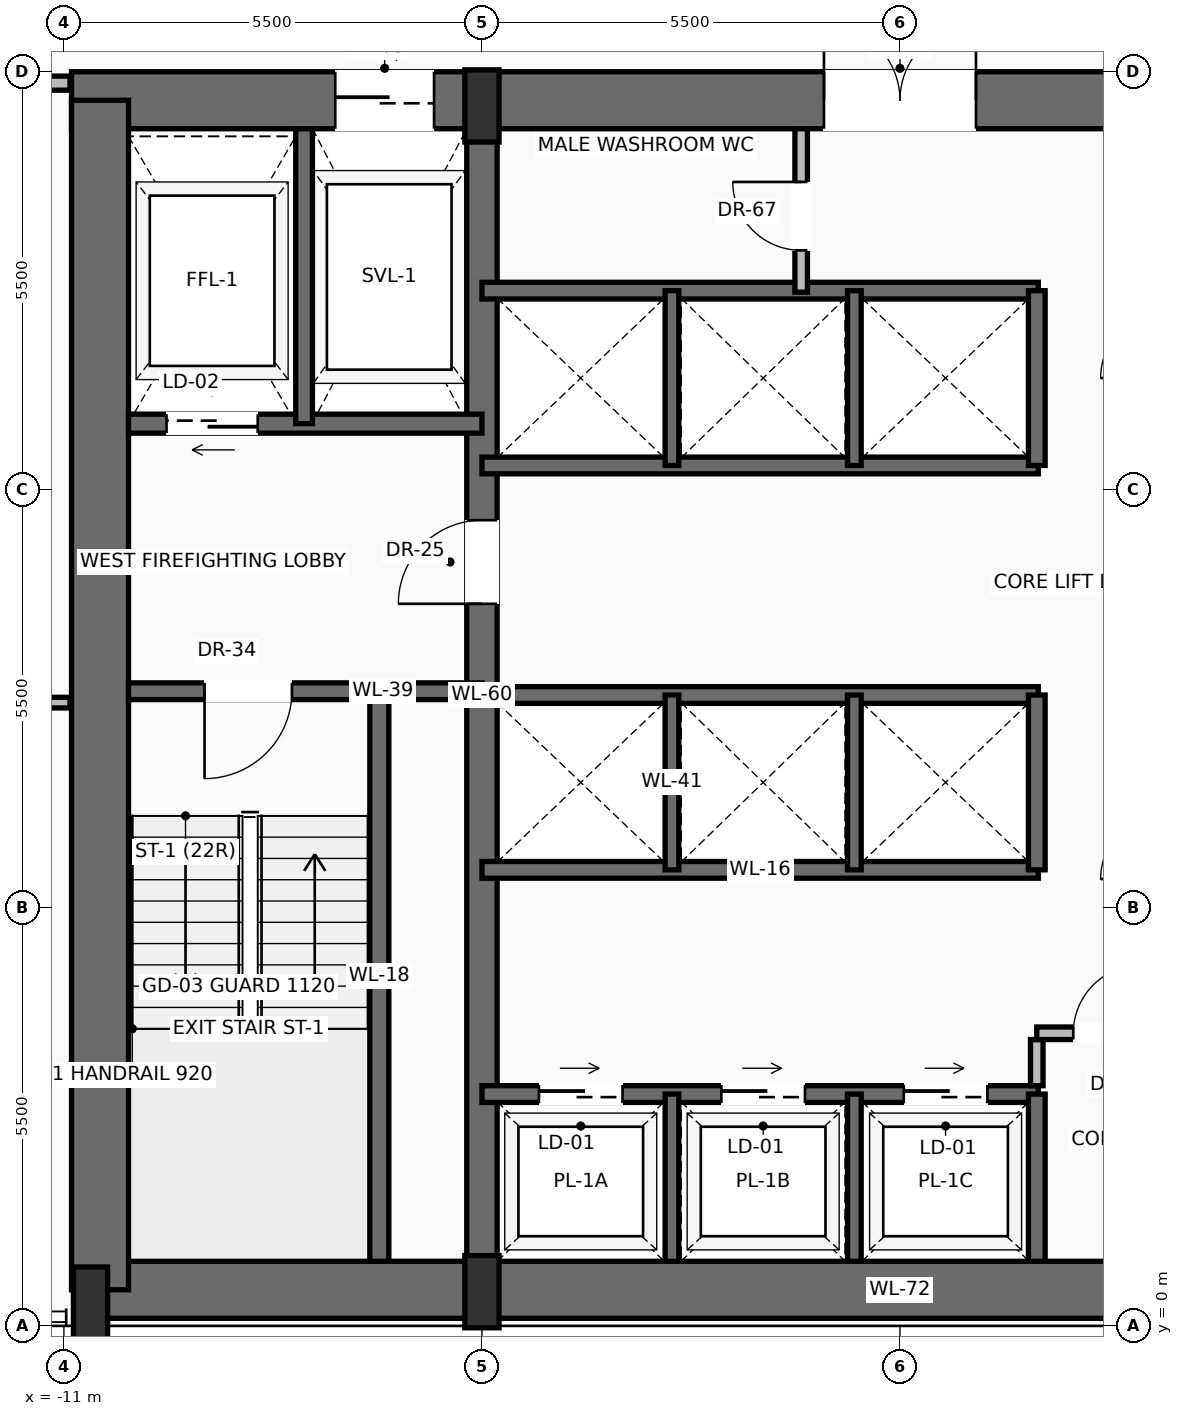
"""IFC4 building model, lengths in metres.
Left out: names, types, materials, properties, quantities, classifications, styles, units other than length and angle.
Written with IfcOpenShell. Run it as: python <this file> out.ifc"""

import sys

from ifc_helpers import new_model, si_unit, direction, frame, frame_2d, origin, origin_2d, place, context, subcontext, project, spatial, rectangle, extrude, source, transform, mapped, element, fill, save


model = new_model("IFC4")
c1 = context("Model", 3, precision=1e-05, world=origin(), true_north=direction((0.0, 1.0)))
c2 = subcontext(c1, "Body", "Model", "MODEL_VIEW")
j1 = project(units=[si_unit("LENGTHUNIT", "METRE"), si_unit("PLANEANGLEUNIT", "RADIAN")], contexts=[c1])
p1 = place(None, origin())
s1 = spatial("IfcSite", under=j1, at=p1, CompositionType="ELEMENT")
p2 = place(p1, origin())
s2 = spatial("IfcBuilding", under=s1, at=p2, CompositionType="ELEMENT")
p3 = place(p2, frame((0.0, 0.0, 102.5)))
s3 = spatial("IfcBuildingStorey", under=s2, at=p3, CompositionType="ELEMENT", Elevation=102.5)
p4 = place(p3, frame((-10.65, 0.475, 0.0), z_axis=(0.0, 0.0, 1.0), x_axis=(1.0, 0.0, 0.0)))
e1 = element("IfcWall", 1, at=p4, inside=s3, PredefinedType="SHEAR", context=c2, shape_type="SweptSolid", body=[
    extrude(rectangle(XDim=21.3, YDim=0.75, at=frame_2d((10.65, 0.0))), origin(), (0.0, 0.0, 1.0), 3.45),
])
p5 = place(p3, frame((-10.9, 16.125, 0.0), z_axis=(0.0, 0.0, 1.0), x_axis=(1.0, 0.0, 0.0)))
e2 = element("IfcWall", 2, at=p5, inside=s3, PredefinedType="SHEAR", context=c2, shape_type="SweptSolid", body=[
    extrude(rectangle(XDim=21.8, YDim=0.75, at=frame_2d((10.9, 0.0))), origin(), (0.0, 0.0, 1.0), 3.45),
])
p6 = place(p5, frame((3.47, 0.0, 0.0)))
e3 = element("IfcOpeningElement", 3, at=p6, cuts=e2, PredefinedType="OPENING", context=c2, shape_type="SweptSolid", body=[
    extrude(rectangle(XDim=1.3, YDim=2.3, at=frame_2d((0.65, 1.15))), frame((0.0, 0.385, 0.0), z_axis=(0.0, -1.0, 0.0), x_axis=(1.0, 0.0, 0.0)), (0.0, 0.0, 1.0), 0.77),
])
p7 = place(p5, frame((9.9, 0.0, 0.0)))
e4 = element("IfcOpeningElement", 4, at=p7, cuts=e2, PredefinedType="OPENING", context=c2, shape_type="SweptSolid", body=[
    extrude(rectangle(XDim=2.0, YDim=2.4, at=frame_2d((1.0, 1.2))), frame((0.0, 0.385, 0.0), z_axis=(0.0, -1.0, 0.0), x_axis=(1.0, 0.0, 0.0)), (0.0, 0.0, 1.0), 0.77),
])
p8 = place(p3, frame((-10.525, 0.475, 0.0), z_axis=(0.0, 0.0, 1.0), x_axis=(0.0, 1.0, 0.0)))
e5 = element("IfcWall", 5, at=p8, inside=s3, PredefinedType="SHEAR", context=c2, shape_type="SweptSolid", body=[
    extrude(rectangle(XDim=15.65, YDim=0.75, at=frame_2d((7.825, 0.0))), origin(), (0.0, 0.0, 1.0), 3.45),
])
p9 = place(p3, frame((-5.5, 0.475, 0.0), z_axis=(0.0, 0.0, 1.0), x_axis=(0.0, 1.0, 0.0)))
e6 = element("IfcWall", 6, at=p9, inside=s3, PredefinedType="SHEAR", context=c2, shape_type="SweptSolid", body=[
    extrude(rectangle(XDim=15.65, YDim=0.4, at=frame_2d((7.825, 0.0))), origin(), (0.0, 0.0, 1.0), 3.45),
])
p10 = place(p9, frame((9.025, 0.0, 0.0)))
e7 = element("IfcOpeningElement", 7, at=p10, cuts=e6, PredefinedType="OPENING", context=c2, shape_type="SweptSolid", body=[
    extrude(rectangle(XDim=1.1, YDim=2.2, at=frame_2d((0.55, 1.1))), frame((0.0, 0.21, 0.0), z_axis=(0.0, -1.0, 0.0), x_axis=(1.0, 0.0, 0.0)), (0.0, 0.0, 1.0), 0.42),
])
m1 = source(origin(), c2, "Body", "SweptSolid", [
    extrude(rectangle(XDim=0.45, YDim=0.95, at=origin_2d()), origin(), (0.0, 0.0, 1.0), 3.7),
])
for number, where, z_axis, x_axis in (
    (8, (-10.65, 0.3, 0.0), (0.0, 0.0, 1.0), (1.0, 0.0, 0.0)),
    (9, (-5.5, 0.45, 0.0), (0.0, 0.0, 1.0), (1.0, 0.0, 0.0)),
    (10, (-5.5, 16.05, 0.0), (0.0, 0.0, 1.0), (1.0, 0.0, 0.0)),
):
    element("IfcColumn", number, at=place(p3, frame(where, z_axis=z_axis, x_axis=x_axis)), inside=s3, PredefinedType="PILASTER", context=c2, shape_type="MappedRepresentation", body=[
        mapped(m1, transform((0.0, 0.0, 0.0), scale=1.0)),
    ])
p11 = place(p3, frame((-6.85, 0.85, 0.0), z_axis=(0.0, 0.0, 1.0), x_axis=(0.0, 1.0, 0.0)))
e11 = element("IfcWall", 11, at=p11, inside=s3, PredefinedType="SOLIDWALL", context=c2, shape_type="SweptSolid", body=[
    extrude(rectangle(XDim=7.5, YDim=0.25, at=frame_2d((3.75, 0.0))), origin(), (0.0, 0.0, 1.0), 3.45),
])
p12 = place(p3, frame((-5.5, 8.35, 0.0), z_axis=(0.0, 0.0, 1.0), x_axis=(-1.0, 0.0, 0.0)))
e12 = element("IfcWall", 12, at=p12, inside=s3, PredefinedType="SOLIDWALL", context=c2, shape_type="SweptSolid", body=[
    extrude(rectangle(XDim=4.65, YDim=0.22, at=frame_2d((2.325, 0.0))), origin(), (0.0, 0.0, 1.0), 3.45),
])
p13 = place(p12, frame((2.5, 0.0, 0.0)))
e13 = element("IfcOpeningElement", 13, at=p13, cuts=e12, PredefinedType="OPENING", context=c2, shape_type="SweptSolid", body=[
    extrude(rectangle(XDim=1.15, YDim=2.2, at=frame_2d((0.575, 1.1))), frame((0.0, 0.12, 0.0), z_axis=(0.0, -1.0, 0.0), x_axis=(1.0, 0.0, 0.0)), (0.0, 0.0, 1.0), 0.24),
])
p14 = place(p3, frame((-5.5, 11.87, 0.0), z_axis=(0.0, 0.0, 1.0), x_axis=(-1.0, 0.0, 0.0)))
e14 = element("IfcWall", 14, at=p14, inside=s3, PredefinedType="SOLIDWALL", context=c2, shape_type="SweptSolid", body=[
    extrude(rectangle(XDim=4.65, YDim=0.25, at=frame_2d((2.325, 0.0))), origin(), (0.0, 0.0, 1.0), 3.45),
])
p15 = place(p14, frame((2.95, 0.0, 0.0)))
e15 = element("IfcOpeningElement", 15, at=p15, cuts=e14, PredefinedType="OPENING", context=c2, shape_type="SweptSolid", body=[
    extrude(rectangle(XDim=1.2, YDim=2.25, at=frame_2d((0.6, 1.125))), frame((0.0, 0.135, 0.0), z_axis=(0.0, -1.0, 0.0), x_axis=(1.0, 0.0, 0.0)), (0.0, 0.0, 1.0), 0.27),
])
p16 = place(p3, frame((-7.84, 11.87, 0.0), z_axis=(0.0, 0.0, 1.0), x_axis=(0.0, 1.0, 0.0)))
e16 = element("IfcWall", 16, at=p16, inside=s3, PredefinedType="SOLIDWALL", context=c2, shape_type="SweptSolid", body=[
    extrude(rectangle(XDim=3.88, YDim=0.22, at=frame_2d((1.94, 0.0))), origin(), (0.0, 0.0, 1.0), 3.45),
])
p17 = place(p3, frame((-5.5, 3.05, 0.0), z_axis=(0.0, 0.0, 1.0), x_axis=(1.0, 0.0, 0.0)))
e17 = element("IfcWall", 17, at=p17, inside=s3, PredefinedType="SOLIDWALL", context=c2, shape_type="SweptSolid", body=[
    extrude(rectangle(XDim=7.32, YDim=0.22, at=frame_2d((3.66, 0.0))), origin(), (0.0, 0.0, 1.0), 3.45),
])
p18 = place(p17, frame((0.75, 0.0, 0.0)))
e18 = element("IfcOpeningElement", 18, at=p18, cuts=e17, PredefinedType="OPENING", context=c2, shape_type="SweptSolid", body=[
    extrude(rectangle(XDim=1.1, YDim=2.2, at=frame_2d((0.55, 1.1))), frame((0.0, 0.12, 0.0), z_axis=(0.0, -1.0, 0.0), x_axis=(1.0, 0.0, 0.0)), (0.0, 0.0, 1.0), 0.24),
])
p19 = place(p17, frame((3.15, 0.0, 0.0)))
e19 = element("IfcOpeningElement", 19, at=p19, cuts=e17, PredefinedType="OPENING", context=c2, shape_type="SweptSolid", body=[
    extrude(rectangle(XDim=1.1, YDim=2.2, at=frame_2d((0.55, 1.1))), frame((0.0, 0.12, 0.0), z_axis=(0.0, -1.0, 0.0), x_axis=(1.0, 0.0, 0.0)), (0.0, 0.0, 1.0), 0.24),
])
p20 = place(p17, frame((5.55, 0.0, 0.0)))
e20 = element("IfcOpeningElement", 20, at=p20, cuts=e17, PredefinedType="OPENING", context=c2, shape_type="SweptSolid", body=[
    extrude(rectangle(XDim=1.1, YDim=2.2, at=frame_2d((0.55, 1.1))), frame((0.0, 0.12, 0.0), z_axis=(0.0, -1.0, 0.0), x_axis=(1.0, 0.0, 0.0)), (0.0, 0.0, 1.0), 0.24),
])
p21 = place(p3, frame((1.8, 0.85, 0.0), z_axis=(0.0, 0.0, 1.0), x_axis=(0.0, 1.0, 0.0)))
e21 = element("IfcWall", 21, at=p21, inside=s3, PredefinedType="SOLIDWALL", context=c2, shape_type="SweptSolid", body=[
    extrude(rectangle(XDim=2.2, YDim=0.22, at=frame_2d((1.1, 0.0))), origin(), (0.0, 0.0, 1.0), 3.45),
])
for number, where, z_axis, x_axis in (
    (22, (-3.0, 0.85, 0.0), (0.0, 0.0, 1.0), (0.0, 1.0, 0.0)),
    (23, (-0.6, 0.85, 0.0), (0.0, 0.0, 1.0), (0.0, 1.0, 0.0)),
):
    element("IfcWall", number, at=place(p3, frame(where, z_axis=z_axis, x_axis=x_axis)), inside=s3, PredefinedType="SOLIDWALL", context=c2, shape_type="SweptSolid", body=[
        extrude(rectangle(XDim=2.2, YDim=0.18, at=frame_2d((1.1, 0.0))), origin(), (0.0, 0.0, 1.0), 3.45),
    ])
p22 = place(p3, frame((1.8, 3.16, 0.0), z_axis=(0.0, 0.0, 1.0), x_axis=(0.0, 1.0, 0.0)))
e24 = element("IfcWall", 24, at=p22, inside=s3, PredefinedType="PARTITIONING", context=c2, shape_type="SweptSolid", body=[
    extrude(rectangle(XDim=0.608, YDim=0.165, at=frame_2d((0.304, 0.0))), origin(), (0.0, 0.0, 1.0), 3.442),
])
p23 = place(p3, frame((1.8, 3.85, 0.0), z_axis=(0.0, 0.0, 1.0), x_axis=(1.0, 0.0, 0.0)))
e25 = element("IfcWall", 25, at=p23, inside=s3, PredefinedType="PARTITIONING", context=c2, shape_type="SweptSolid", body=[
    extrude(rectangle(XDim=3.62, YDim=0.165, at=frame_2d((1.81, 0.0))), origin(), (0.0, 0.0, 1.0), 3.442),
])
p24 = place(p23, frame((0.48, 0.0, 0.0)))
e26 = element("IfcOpeningElement", 26, at=p24, cuts=e25, PredefinedType="OPENING", context=c2, shape_type="SweptSolid", body=[
    extrude(rectangle(XDim=0.9, YDim=2.1, at=frame_2d((0.45, 1.05))), frame((0.0, 0.093, 0.0), z_axis=(0.0, -1.0, 0.0), x_axis=(1.0, 0.0, 0.0)), (0.0, 0.0, 1.0), 0.185),
])
for number, where, z_axis, x_axis in (
    (27, (-5.5, 6.0, 0.0), (0.0, 0.0, 1.0), (1.0, 0.0, 0.0)),
    (28, (-5.5, 8.3, 0.0), (0.0, 0.0, 1.0), (1.0, 0.0, 0.0)),
):
    element("IfcWall", number, at=place(p3, frame(where, z_axis=z_axis, x_axis=x_axis)), inside=s3, PredefinedType="SOLIDWALL", context=c2, shape_type="SweptSolid", body=[
        extrude(rectangle(XDim=7.32, YDim=0.22, at=frame_2d((3.66, 0.0))), origin(), (0.0, 0.0, 1.0), 3.45),
    ])
p25 = place(p3, frame((1.8, 6.0, 0.0), z_axis=(0.0, 0.0, 1.0), x_axis=(0.0, 1.0, 0.0)))
e29 = element("IfcWall", 29, at=p25, inside=s3, PredefinedType="SOLIDWALL", context=c2, shape_type="SweptSolid", body=[
    extrude(rectangle(XDim=2.3, YDim=0.22, at=frame_2d((1.15, 0.0))), origin(), (0.0, 0.0, 1.0), 3.45),
])
for number, where, z_axis, x_axis in (
    (30, (-3.0, 6.0, 0.0), (0.0, 0.0, 1.0), (0.0, 1.0, 0.0)),
    (31, (-0.6, 6.0, 0.0), (0.0, 0.0, 1.0), (0.0, 1.0, 0.0)),
):
    element("IfcWall", number, at=place(p3, frame(where, z_axis=z_axis, x_axis=x_axis)), inside=s3, PredefinedType="SOLIDWALL", context=c2, shape_type="SweptSolid", body=[
        extrude(rectangle(XDim=2.3, YDim=0.18, at=frame_2d((1.15, 0.0))), origin(), (0.0, 0.0, 1.0), 3.45),
    ])
for number, where, z_axis, x_axis in (
    (32, (-5.5, 11.32, 0.0), (0.0, 0.0, 1.0), (1.0, 0.0, 0.0)),
    (33, (-5.5, 13.62, 0.0), (0.0, 0.0, 1.0), (1.0, 0.0, 0.0)),
):
    element("IfcWall", number, at=place(p3, frame(where, z_axis=z_axis, x_axis=x_axis)), inside=s3, PredefinedType="SOLIDWALL", context=c2, shape_type="SweptSolid", body=[
        extrude(rectangle(XDim=7.32, YDim=0.22, at=frame_2d((3.66, 0.0))), origin(), (0.0, 0.0, 1.0), 3.45),
    ])
p26 = place(p3, frame((1.8, 11.32, 0.0), z_axis=(0.0, 0.0, 1.0), x_axis=(0.0, 1.0, 0.0)))
e34 = element("IfcWall", 34, at=p26, inside=s3, PredefinedType="SOLIDWALL", context=c2, shape_type="SweptSolid", body=[
    extrude(rectangle(XDim=2.3, YDim=0.22, at=frame_2d((1.15, 0.0))), origin(), (0.0, 0.0, 1.0), 3.45),
])
for number, where, z_axis, x_axis in (
    (35, (-3.0, 11.32, 0.0), (0.0, 0.0, 1.0), (0.0, 1.0, 0.0)),
    (36, (-0.6, 11.32, 0.0), (0.0, 0.0, 1.0), (0.0, 1.0, 0.0)),
):
    element("IfcWall", number, at=place(p3, frame(where, z_axis=z_axis, x_axis=x_axis)), inside=s3, PredefinedType="SOLIDWALL", context=c2, shape_type="SweptSolid", body=[
        extrude(rectangle(XDim=2.3, YDim=0.18, at=frame_2d((1.15, 0.0))), origin(), (0.0, 0.0, 1.0), 3.45),
    ])
p27 = place(p3, frame((-1.3, 13.6, 0.0), z_axis=(0.0, 0.0, 1.0), x_axis=(0.0, 1.0, 0.0)))
e37 = element("IfcWall", 37, at=p27, inside=s3, PredefinedType="PARTITIONING", context=c2, shape_type="SweptSolid", body=[
    extrude(rectangle(XDim=2.15, YDim=0.165, at=frame_2d((1.075, 0.0))), origin(), (0.0, 0.0, 1.0), 3.442),
])
p28 = place(p27, frame((0.55, 0.0, 0.0)))
e38 = element("IfcOpeningElement", 38, at=p28, cuts=e37, PredefinedType="OPENING", context=c2, shape_type="SweptSolid", body=[
    extrude(rectangle(XDim=0.9, YDim=2.1, at=frame_2d((0.45, 1.05))), frame((0.0, 0.093, 0.0), z_axis=(0.0, -1.0, 0.0), x_axis=(1.0, 0.0, 0.0)), (0.0, 0.0, 1.0), 0.185),
])
p29 = place(p3, frame((-22.762, 16.35, 0.0), z_axis=(0.0, 0.0, 1.0), x_axis=(1.0, 0.0, 0.0)))
e39 = element("IfcWall", 39, at=p29, inside=s3, PredefinedType="PARTITIONING", context=c2, shape_type="SweptSolid", body=[
    extrude(rectangle(XDim=11.842, YDim=0.185, at=frame_2d((5.921, 0.0))), origin(), (0.0, 0.0, 1.0), 2.747),
])
p30 = place(p29, frame((4.888, 0.0, 0.0)))
e40 = element("IfcOpeningElement", 40, at=p30, cuts=e39, PredefinedType="OPENING", context=c2, shape_type="SweptSolid", body=[
    extrude(rectangle(XDim=0.95, YDim=2.2, at=frame_2d((0.475, 1.1))), frame((0.0, 0.103, 0.0), z_axis=(0.0, -1.0, 0.0), x_axis=(1.0, 0.0, 0.0)), (0.0, 0.0, 1.0), 0.205),
])
p31 = place(p3, frame((-27.534, 8.2, 0.0), z_axis=(0.0, 0.0, 1.0), x_axis=(1.0, 0.0, 0.0)))
e41 = element("IfcWall", 41, at=p31, inside=s3, PredefinedType="PARTITIONING", context=c2, shape_type="SweptSolid", body=[
    extrude(rectangle(XDim=16.615, YDim=0.14, at=frame_2d((8.307, 0.0))), origin(), (0.0, 0.0, 1.0), 3.442),
])
p32 = place(p31, frame((7.841, 0.0, 0.0)))
e42 = element("IfcOpeningElement", 42, at=p32, cuts=e41, PredefinedType="OPENING", context=c2, shape_type="SweptSolid", body=[
    extrude(rectangle(XDim=0.95, YDim=2.2, at=frame_2d((0.475, 1.1))), frame((0.0, 0.08, 0.0), z_axis=(0.0, -1.0, 0.0), x_axis=(1.0, 0.0, 0.0)), (0.0, 0.0, 1.0), 0.16),
])
m2 = source(origin(), c2, "Body", "SweptSolid", [
    extrude(rectangle(XDim=1.15, YDim=2.2, at=frame_2d((0.575, 1.1))), frame((0.0, 0.025, 0.0), z_axis=(0.0, -1.0, 0.0), x_axis=(1.0, 0.0, 0.0)), (0.0, 0.0, 1.0), 0.05),
])
p33 = place(p13, origin())
e43 = element("IfcDoor", 43, at=p33, inside=s3, OperationType="SINGLE_SWING_RIGHT", PredefinedType="DOOR", context=c2, shape_type="MappedRepresentation", body=[
    mapped(m2, transform((0.0, 0.0, 0.0), scale=1.0)),
])
fill(e13, e43)
m3 = source(origin(), c2, "Body", "SweptSolid", [
    extrude(rectangle(XDim=1.1, YDim=2.2, at=frame_2d((0.55, 1.1))), frame((0.0, 0.025, 0.0), z_axis=(0.0, -1.0, 0.0), x_axis=(1.0, 0.0, 0.0)), (0.0, 0.0, 1.0), 0.05),
])
p34 = place(p10, origin())
e44 = element("IfcDoor", 44, at=p34, inside=s3, OperationType="SINGLE_SWING_LEFT", PredefinedType="DOOR", context=c2, shape_type="MappedRepresentation", body=[
    mapped(m3, transform((0.0, 0.0, 0.0), scale=1.0)),
])
fill(e7, e44)
m4 = source(origin(), c2, "Body", "SweptSolid", [
    extrude(rectangle(XDim=1.2, YDim=2.25, at=frame_2d((0.6, 1.125))), frame((0.0, 0.025, 0.0), z_axis=(0.0, -1.0, 0.0), x_axis=(1.0, 0.0, 0.0)), (0.0, 0.0, 1.0), 0.05),
])
p35 = place(p15, origin())
e45 = element("IfcDoor", 45, at=p35, inside=s3, OperationType="SLIDING_TO_LEFT", PredefinedType="DOOR", context=c2, shape_type="MappedRepresentation", body=[
    mapped(m4, transform((0.0, 0.0, 0.0), scale=1.0)),
])
fill(e15, e45)
m5 = source(origin(), c2, "Body", "SweptSolid", [
    extrude(rectangle(XDim=1.3, YDim=2.3, at=frame_2d((0.65, 1.15))), frame((0.0, 0.025, 0.0), z_axis=(0.0, -1.0, 0.0), x_axis=(1.0, 0.0, 0.0)), (0.0, 0.0, 1.0), 0.05),
])
p36 = place(p6, origin())
e46 = element("IfcDoor", 46, at=p36, inside=s3, OperationType="SLIDING_TO_RIGHT", PredefinedType="DOOR", context=c2, shape_type="MappedRepresentation", body=[
    mapped(m5, transform((0.0, 0.0, 0.0), scale=1.0)),
])
fill(e3, e46)
m6 = source(origin(), c2, "Body", "SweptSolid", [
    extrude(rectangle(XDim=2.0, YDim=2.4, at=frame_2d((1.0, 1.2))), frame((0.0, 0.025, 0.0), z_axis=(0.0, -1.0, 0.0), x_axis=(1.0, 0.0, 0.0)), (0.0, 0.0, 1.0), 0.05),
])
p37 = place(p7, origin())
e47 = element("IfcDoor", 47, at=p37, inside=s3, OperationType="DOUBLE_DOOR_SINGLE_SWING", PredefinedType="DOOR", context=c2, shape_type="MappedRepresentation", body=[
    mapped(m6, transform((0.0, 0.0, 0.0), scale=1.0)),
])
fill(e4, e47)
m7 = source(origin(), c2, "Body", "SweptSolid", [
    extrude(rectangle(XDim=1.1, YDim=2.2, at=frame_2d((0.55, 1.1))), frame((0.0, 0.025, 0.0), z_axis=(0.0, -1.0, 0.0), x_axis=(1.0, 0.0, 0.0)), (0.0, 0.0, 1.0), 0.05),
])
p38 = place(p18, origin())
e48 = element("IfcDoor", 48, at=p38, inside=s3, OperationType="SLIDING_TO_RIGHT", PredefinedType="DOOR", context=c2, shape_type="MappedRepresentation", body=[
    mapped(m7, transform((0.0, 0.0, 0.0), scale=1.0)),
])
fill(e18, e48)
p39 = place(p19, origin())
e49 = element("IfcDoor", 49, at=p39, inside=s3, OperationType="SLIDING_TO_RIGHT", PredefinedType="DOOR", context=c2, shape_type="MappedRepresentation", body=[
    mapped(m7, transform((0.0, 0.0, 0.0), scale=1.0)),
])
fill(e19, e49)
p40 = place(p20, origin())
e50 = element("IfcDoor", 50, at=p40, inside=s3, OperationType="SLIDING_TO_RIGHT", PredefinedType="DOOR", context=c2, shape_type="MappedRepresentation", body=[
    mapped(m7, transform((0.0, 0.0, 0.0), scale=1.0)),
])
fill(e20, e50)
m8 = source(origin(), c2, "Body", "SweptSolid", [
    extrude(rectangle(XDim=0.9, YDim=2.1, at=frame_2d((0.45, 1.05))), frame((0.0, 0.025, 0.0), z_axis=(0.0, -1.0, 0.0), x_axis=(1.0, 0.0, 0.0)), (0.0, 0.0, 1.0), 0.05),
])
p41 = place(p24, origin())
e51 = element("IfcDoor", 51, at=p41, inside=s3, OperationType="SINGLE_SWING_RIGHT", PredefinedType="DOOR", context=c2, shape_type="MappedRepresentation", body=[
    mapped(m8, transform((0.0, 0.0, 0.0), scale=1.0)),
])
fill(e26, e51)
p42 = place(p28, origin())
e52 = element("IfcDoor", 52, at=p42, inside=s3, OperationType="SINGLE_SWING_RIGHT", PredefinedType="DOOR", context=c2, shape_type="MappedRepresentation", body=[
    mapped(m8, transform((0.0, 0.0, 0.0), scale=1.0)),
])
fill(e38, e52)
save(model, sys.argv[1])
